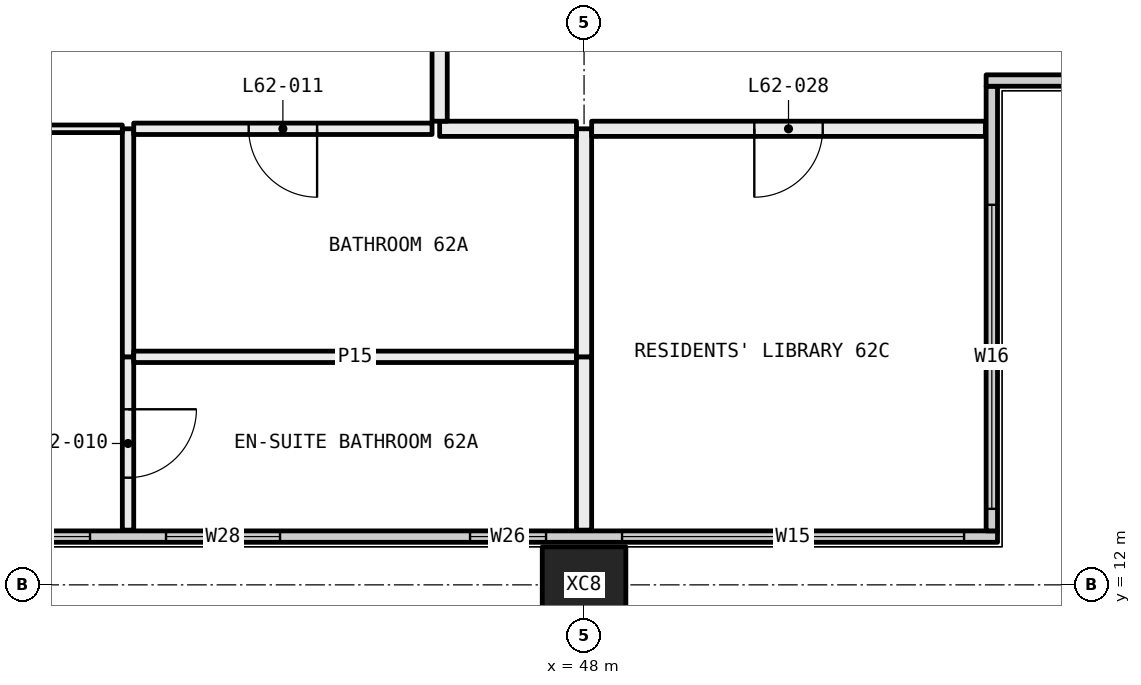
"""IFC4 building model, lengths in metres.
Left out: names, types, materials, properties, quantities, classifications, styles, units other than length and angle.
Written with IfcOpenShell. Run it as: python <this file> out.ifc"""

import sys

from ifc_helpers import new_model, si_unit, direction, frame, frame_2d, origin, origin_2d, place, context, subcontext, project, spatial, rectangle, hollow_rectangle, extrude, element, fill, save


model = new_model("IFC4")
c1 = context("Model", 3, precision=1e-05, world=origin(), true_north=direction((0.0, 1.0)))
c2 = subcontext(c1, "Body", "Model", "MODEL_VIEW")
j1 = project(units=[si_unit("LENGTHUNIT", "METRE"), si_unit("PLANEANGLEUNIT", "RADIAN")], contexts=[c1])
p1 = place(None, origin())
s1 = spatial("IfcSite", under=j1, at=p1, CompositionType="ELEMENT")
p2 = place(p1, origin())
s2 = spatial("IfcBuilding", under=s1, at=p2, CompositionType="ELEMENT")
p3 = place(p2, frame((0.0, 0.0, 231.75)))
s3 = spatial("IfcBuildingStorey", under=s2, at=p3, CompositionType="ELEMENT", Elevation=231.75)
p4 = place(p3, frame((48.0, 12.0, -0.4), z_axis=(0.0, 0.0, 1.0), x_axis=(1.0, 0.0, 0.0)))
e1 = element("IfcColumn", 1, at=p4, inside=s3, PredefinedType="COLUMN", context=c2, shape_type="SweptSolid", body=[
    extrude(hollow_rectangle(XDim=1.1, YDim=1.0, WallThickness=0.04, at=origin_2d()), origin(), (0.0, 0.0, 1.0), 3.45),
])
p5 = place(p3, frame((18.56, 12.635, 0.0), z_axis=(0.0, 0.0, 1.0), x_axis=(1.0, 0.0, 0.0)))
e2 = element("IfcWall", 2, at=p5, inside=s3, PredefinedType="ELEMENTEDWALL", context=c2, shape_type="SweptSolid", body=[
    extrude(rectangle(XDim=34.88, YDim=0.15, at=frame_2d((17.44, 0.0))), origin(), (0.0, 0.0, 1.0), 3.05),
])
p6 = place(p5, frame((0.44, 0.0, 0.45)))
e3 = element("IfcOpeningElement", 3, at=p6, cuts=e2, PredefinedType="OPENING", context=c2, shape_type="SweptSolid", body=[
    extrude(rectangle(XDim=4.5, YDim=2.55, at=frame_2d((2.25, 1.275))), frame((0.0, 0.085, 0.0), z_axis=(0.0, -1.0, 0.0), x_axis=(1.0, 0.0, 0.0)), (0.0, 0.0, 1.0), 0.17),
])
p7 = place(p5, frame((5.94, 0.0, 0.45)))
e4 = element("IfcOpeningElement", 4, at=p7, cuts=e2, PredefinedType="OPENING", context=c2, shape_type="SweptSolid", body=[
    extrude(rectangle(XDim=1.0, YDim=2.55, at=frame_2d((0.5, 1.275))), frame((0.0, 0.085, 0.0), z_axis=(0.0, -1.0, 0.0), x_axis=(1.0, 0.0, 0.0)), (0.0, 0.0, 1.0), 0.17),
])
p8 = place(p5, frame((9.44, 0.0, 0.45)))
e5 = element("IfcOpeningElement", 5, at=p8, cuts=e2, PredefinedType="OPENING", context=c2, shape_type="SweptSolid", body=[
    extrude(rectangle(XDim=1.5, YDim=2.55, at=frame_2d((0.75, 1.275))), frame((0.0, 0.085, 0.0), z_axis=(0.0, -1.0, 0.0), x_axis=(1.0, 0.0, 0.0)), (0.0, 0.0, 1.0), 0.17),
])
p9 = place(p5, frame((11.94, 0.0, 0.45)))
e6 = element("IfcOpeningElement", 6, at=p9, cuts=e2, PredefinedType="OPENING", context=c2, shape_type="SweptSolid", body=[
    extrude(rectangle(XDim=1.5, YDim=2.55, at=frame_2d((0.75, 1.275))), frame((0.0, 0.085, 0.0), z_axis=(0.0, -1.0, 0.0), x_axis=(1.0, 0.0, 0.0)), (0.0, 0.0, 1.0), 0.17),
])
p10 = place(p5, frame((15.94, 0.0, 0.45)))
e7 = element("IfcOpeningElement", 7, at=p10, cuts=e2, PredefinedType="OPENING", context=c2, shape_type="SweptSolid", body=[
    extrude(rectangle(XDim=1.0, YDim=2.55, at=frame_2d((0.5, 1.275))), frame((0.0, 0.085, 0.0), z_axis=(0.0, -1.0, 0.0), x_axis=(1.0, 0.0, 0.0)), (0.0, 0.0, 1.0), 0.17),
])
p11 = place(p5, frame((17.94, 0.0, 0.45)))
e8 = element("IfcOpeningElement", 8, at=p11, cuts=e2, PredefinedType="OPENING", context=c2, shape_type="SweptSolid", body=[
    extrude(rectangle(XDim=1.0, YDim=2.55, at=frame_2d((0.5, 1.275))), frame((0.0, 0.085, 0.0), z_axis=(0.0, -1.0, 0.0), x_axis=(1.0, 0.0, 0.0)), (0.0, 0.0, 1.0), 0.17),
])
p12 = place(p5, frame((21.44, 0.0, 0.45)))
e9 = element("IfcOpeningElement", 9, at=p12, cuts=e2, PredefinedType="OPENING", context=c2, shape_type="SweptSolid", body=[
    extrude(rectangle(XDim=1.5, YDim=2.55, at=frame_2d((0.75, 1.275))), frame((0.0, 0.085, 0.0), z_axis=(0.0, -1.0, 0.0), x_axis=(1.0, 0.0, 0.0)), (0.0, 0.0, 1.0), 0.17),
])
p13 = place(p5, frame((23.94, 0.0, 0.45)))
e10 = element("IfcOpeningElement", 10, at=p13, cuts=e2, PredefinedType="OPENING", context=c2, shape_type="SweptSolid", body=[
    extrude(rectangle(XDim=1.5, YDim=2.55, at=frame_2d((0.75, 1.275))), frame((0.0, 0.085, 0.0), z_axis=(0.0, -1.0, 0.0), x_axis=(1.0, 0.0, 0.0)), (0.0, 0.0, 1.0), 0.17),
])
p14 = place(p5, frame((27.94, 0.0, 0.45)))
e11 = element("IfcOpeningElement", 11, at=p14, cuts=e2, PredefinedType="OPENING", context=c2, shape_type="SweptSolid", body=[
    extrude(rectangle(XDim=1.0, YDim=2.55, at=frame_2d((0.5, 1.275))), frame((0.0, 0.085, 0.0), z_axis=(0.0, -1.0, 0.0), x_axis=(1.0, 0.0, 0.0)), (0.0, 0.0, 1.0), 0.17),
])
p15 = place(p5, frame((29.94, 0.0, 0.45)))
e12 = element("IfcOpeningElement", 12, at=p15, cuts=e2, PredefinedType="OPENING", context=c2, shape_type="SweptSolid", body=[
    extrude(rectangle(XDim=4.5, YDim=2.55, at=frame_2d((2.25, 1.275))), frame((0.0, 0.085, 0.0), z_axis=(0.0, -1.0, 0.0), x_axis=(1.0, 0.0, 0.0)), (0.0, 0.0, 1.0), 0.17),
])
p16 = place(p3, frame((53.365, 12.71, 0.0), z_axis=(0.0, 0.0, 1.0), x_axis=(0.0, 1.0, 0.0)))
e13 = element("IfcWall", 13, at=p16, inside=s3, PredefinedType="ELEMENTEDWALL", context=c2, shape_type="SweptSolid", body=[
    extrude(rectangle(XDim=5.85, YDim=0.15, at=frame_2d((2.925, 0.0))), origin(), (0.0, 0.0, 1.0), 3.05),
])
p17 = place(p16, frame((0.29, 0.0, 0.45)))
e14 = element("IfcOpeningElement", 14, at=p17, cuts=e13, PredefinedType="OPENING", context=c2, shape_type="SweptSolid", body=[
    extrude(rectangle(XDim=4.0, YDim=2.55, at=frame_2d((2.0, 1.275))), frame((0.0, 0.085, 0.0), z_axis=(0.0, -1.0, 0.0), x_axis=(1.0, 0.0, 0.0)), (0.0, 0.0, 1.0), 0.17),
])
p18 = place(p3, frame((53.29, 18.635, 0.0), z_axis=(0.0, 0.0, 1.0), x_axis=(1.0, 0.0, 0.0)))
e15 = element("IfcWall", 15, at=p18, inside=s3, PredefinedType="ELEMENTEDWALL", context=c2, shape_type="SweptSolid", body=[
    extrude(rectangle(XDim=6.15, YDim=0.15, at=frame_2d((3.075, 0.0))), origin(), (0.0, 0.0, 1.0), 3.05),
])
p19 = place(p18, frame((1.71, 0.0, 0.45)))
e16 = element("IfcOpeningElement", 16, at=p19, cuts=e15, PredefinedType="OPENING", context=c2, shape_type="SweptSolid", body=[
    extrude(rectangle(XDim=4.0, YDim=2.55, at=frame_2d((2.0, 1.275))), frame((0.0, 0.085, 0.0), z_axis=(0.0, -1.0, 0.0), x_axis=(1.0, 0.0, 0.0)), (0.0, 0.0, 1.0), 0.17),
])
p20 = place(p3, frame((42.0, 12.72, 0.0), z_axis=(0.0, 0.0, 1.0), x_axis=(0.0, 1.0, 0.0)))
e17 = element("IfcWall", 17, at=p20, inside=s3, PredefinedType="PARTITIONING", context=c2, shape_type="SweptSolid", body=[
    extrude(rectangle(XDim=2.28, YDim=0.15, at=frame_2d((1.14, 0.0))), origin(), (0.0, 0.0, 1.0), 3.05),
])
p21 = place(p20, frame((0.69, 0.0, 0.0)))
e18 = element("IfcOpeningElement", 18, at=p21, cuts=e17, PredefinedType="OPENING", context=c2, shape_type="SweptSolid", body=[
    extrude(rectangle(XDim=0.9, YDim=2.1, at=frame_2d((0.45, 1.05))), frame((0.0, 0.085, 0.0), z_axis=(0.0, -1.0, 0.0), x_axis=(1.0, 0.0, 0.0)), (0.0, 0.0, 1.0), 0.17),
])
p22 = place(p3, frame((42.0, 15.0, 0.0), z_axis=(0.0, 0.0, 1.0), x_axis=(0.0, 1.0, 0.0)))
e19 = element("IfcWall", 19, at=p22, inside=s3, PredefinedType="PARTITIONING", context=c2, shape_type="SweptSolid", body=[
    extrude(rectangle(XDim=3.0, YDim=0.15, at=frame_2d((1.5, 0.0))), origin(), (0.0, 0.0, 1.0), 3.05),
])
p23 = place(p3, frame((41.925, 18.0, 0.0), z_axis=(0.0, 0.0, 1.0), x_axis=(-1.0, 0.0, 0.0)))
e20 = element("IfcWall", 20, at=p23, inside=s3, PredefinedType="PARTITIONING", context=c2, shape_type="SweptSolid", body=[
    extrude(rectangle(XDim=5.875, YDim=0.1, at=frame_2d((2.938, 0.0))), origin(), (0.0, 0.0, 1.0), 2.45),
])
p24 = place(p23, frame((2.488, 0.0, 0.0)))
e21 = element("IfcOpeningElement", 21, at=p24, cuts=e20, PredefinedType="OPENING", context=c2, shape_type="SweptSolid", body=[
    extrude(rectangle(XDim=0.9, YDim=2.1, at=frame_2d((0.45, 1.05))), frame((0.0, 0.06, 0.0), z_axis=(0.0, -1.0, 0.0), x_axis=(1.0, 0.0, 0.0)), (0.0, 0.0, 1.0), 0.12),
])
p25 = place(p3, frame((47.9, 15.0, 0.0), z_axis=(0.0, 0.0, 1.0), x_axis=(-1.0, 0.0, 0.0)))
e22 = element("IfcWall", 22, at=p25, inside=s3, PredefinedType="PARTITIONING", context=c2, shape_type="SweptSolid", body=[
    extrude(rectangle(XDim=5.825, YDim=0.15, at=frame_2d((2.913, 0.0))), origin(), (0.0, 0.0, 1.0), 3.05),
])
p26 = place(p3, frame((48.0, 12.72, 0.0), z_axis=(0.0, 0.0, 1.0), x_axis=(0.0, 1.0, 0.0)))
e23 = element("IfcWall", 23, at=p26, inside=s3, PredefinedType="PARTITIONING", context=c2, shape_type="SweptSolid", body=[
    extrude(rectangle(XDim=2.28, YDim=0.2, at=frame_2d((1.14, 0.0))), origin(), (0.0, 0.0, 1.0), 3.05),
])
p27 = place(p3, frame((46.0, 18.0, 0.0), z_axis=(0.0, 0.0, 1.0), x_axis=(-1.0, 0.0, 0.0)))
e24 = element("IfcWall", 24, at=p27, inside=s3, PredefinedType="PARTITIONING", context=c2, shape_type="SweptSolid", body=[
    extrude(rectangle(XDim=3.925, YDim=0.15, at=frame_2d((1.962, 0.0))), origin(), (0.0, 0.0, 1.0), 3.05),
])
p28 = place(p27, frame((1.512, 0.0, 0.0)))
e25 = element("IfcOpeningElement", 25, at=p28, cuts=e24, PredefinedType="OPENING", context=c2, shape_type="SweptSolid", body=[
    extrude(rectangle(XDim=0.9, YDim=2.1, at=frame_2d((0.45, 1.05))), frame((0.0, 0.085, 0.0), z_axis=(0.0, -1.0, 0.0), x_axis=(1.0, 0.0, 0.0)), (0.0, 0.0, 1.0), 0.17),
])
p29 = place(p3, frame((48.0, 15.0, 0.0), z_axis=(0.0, 0.0, 1.0), x_axis=(0.0, 1.0, 0.0)))
e26 = element("IfcWall", 26, at=p29, inside=s3, PredefinedType="PARTITIONING", context=c2, shape_type="SweptSolid", body=[
    extrude(rectangle(XDim=3.0, YDim=0.2, at=frame_2d((1.5, 0.0))), origin(), (0.0, 0.0, 1.0), 3.05),
])
p30 = place(p3, frame((47.9, 18.0, 0.0), z_axis=(0.0, 0.0, 1.0), x_axis=(-1.0, 0.0, 0.0)))
e27 = element("IfcWall", 27, at=p30, inside=s3, PredefinedType="PARTITIONING", context=c2, shape_type="SweptSolid", body=[
    extrude(rectangle(XDim=1.8, YDim=0.2, at=frame_2d((0.9, 0.0))), origin(), (0.0, 0.0, 1.0), 3.05),
])
p31 = place(p3, frame((46.1, 18.1, 0.0), z_axis=(0.0, 0.0, 1.0), x_axis=(0.0, 1.0, 0.0)))
e28 = element("IfcWall", 28, at=p31, inside=s3, PredefinedType="PARTITIONING", context=c2, shape_type="SweptSolid", body=[
    extrude(rectangle(XDim=6.2, YDim=0.2, at=frame_2d((3.1, 0.0))), origin(), (0.0, 0.0, 1.0), 2.45),
])
p32 = place(p3, frame((53.28, 18.0, 0.0), z_axis=(0.0, 0.0, 1.0), x_axis=(-1.0, 0.0, 0.0)))
e29 = element("IfcWall", 29, at=p32, inside=s3, PredefinedType="PARTITIONING", context=c2, shape_type="SweptSolid", body=[
    extrude(rectangle(XDim=5.18, YDim=0.2, at=frame_2d((2.59, 0.0))), origin(), (0.0, 0.0, 1.0), 3.05),
])
p33 = place(p32, frame((2.14, 0.0, 0.0)))
e30 = element("IfcOpeningElement", 30, at=p33, cuts=e29, PredefinedType="OPENING", context=c2, shape_type="SweptSolid", body=[
    extrude(rectangle(XDim=0.9, YDim=2.1, at=frame_2d((0.45, 1.05))), frame((0.0, 0.11, 0.0), z_axis=(0.0, -1.0, 0.0), x_axis=(1.0, 0.0, 0.0)), (0.0, 0.0, 1.0), 0.22),
])
p34 = place(p12, origin())
e31 = element("IfcWindow", 31, at=p34, inside=s3, PartitioningType="SINGLE_PANEL", PredefinedType="WINDOW", context=c2, shape_type="SweptSolid", body=[
    extrude(rectangle(XDim=1.5, YDim=2.55, at=frame_2d((0.75, 1.275))), frame((0.0, 0.03, 0.0), z_axis=(0.0, -1.0, 0.0), x_axis=(1.0, 0.0, 0.0)), (0.0, 0.0, 1.0), 0.06),
])
fill(e9, e31)
p35 = place(p13, origin())
e32 = element("IfcWindow", 32, at=p35, inside=s3, PartitioningType="SINGLE_PANEL", PredefinedType="WINDOW", context=c2, shape_type="SweptSolid", body=[
    extrude(rectangle(XDim=1.5, YDim=2.55, at=frame_2d((0.75, 1.275))), frame((0.0, 0.03, 0.0), z_axis=(0.0, -1.0, 0.0), x_axis=(1.0, 0.0, 0.0)), (0.0, 0.0, 1.0), 0.06),
])
fill(e10, e32)
p36 = place(p14, origin())
e33 = element("IfcWindow", 33, at=p36, inside=s3, PartitioningType="SINGLE_PANEL", PredefinedType="WINDOW", context=c2, shape_type="SweptSolid", body=[
    extrude(rectangle(XDim=1.0, YDim=2.55, at=frame_2d((0.5, 1.275))), frame((0.0, 0.03, 0.0), z_axis=(0.0, -1.0, 0.0), x_axis=(1.0, 0.0, 0.0)), (0.0, 0.0, 1.0), 0.06),
])
fill(e11, e33)
p37 = place(p15, origin())
e34 = element("IfcWindow", 34, at=p37, inside=s3, PartitioningType="SINGLE_PANEL", PredefinedType="WINDOW", context=c2, shape_type="SweptSolid", body=[
    extrude(rectangle(XDim=4.5, YDim=2.55, at=frame_2d((2.25, 1.275))), frame((0.0, 0.03, 0.0), z_axis=(0.0, -1.0, 0.0), x_axis=(1.0, 0.0, 0.0)), (0.0, 0.0, 1.0), 0.06),
])
fill(e12, e34)
p38 = place(p17, origin())
e35 = element("IfcWindow", 35, at=p38, inside=s3, PartitioningType="SINGLE_PANEL", PredefinedType="WINDOW", context=c2, shape_type="SweptSolid", body=[
    extrude(rectangle(XDim=4.0, YDim=2.55, at=frame_2d((2.0, 1.275))), frame((0.0, 0.03, 0.0), z_axis=(0.0, -1.0, 0.0), x_axis=(1.0, 0.0, 0.0)), (0.0, 0.0, 1.0), 0.06),
])
fill(e14, e35)
p39 = place(p21, frame((0.9, 0.0, 0.0), x_axis=(-1.0, 0.0, 0.0)))
e36 = element("IfcDoor", 36, at=p39, inside=s3, OperationType="SINGLE_SWING_RIGHT", PredefinedType="DOOR", context=c2, shape_type="SweptSolid", body=[
    extrude(rectangle(XDim=0.9, YDim=2.1, at=frame_2d((0.45, 1.05))), frame((0.0, 0.025, 0.0), z_axis=(0.0, -1.0, 0.0), x_axis=(1.0, 0.0, 0.0)), (0.0, 0.0, 1.0), 0.05),
])
fill(e18, e36)
p40 = place(p28, origin())
e37 = element("IfcDoor", 37, at=p40, inside=s3, OperationType="SINGLE_SWING_RIGHT", PredefinedType="DOOR", context=c2, shape_type="SweptSolid", body=[
    extrude(rectangle(XDim=0.9, YDim=2.1, at=frame_2d((0.45, 1.05))), frame((0.0, 0.025, 0.0), z_axis=(0.0, -1.0, 0.0), x_axis=(1.0, 0.0, 0.0)), (0.0, 0.0, 1.0), 0.05),
])
fill(e25, e37)
p41 = place(p33, origin())
e38 = element("IfcDoor", 38, at=p41, inside=s3, OperationType="SINGLE_SWING_LEFT", PredefinedType="DOOR", context=c2, shape_type="SweptSolid", body=[
    extrude(rectangle(XDim=0.9, YDim=2.1, at=frame_2d((0.45, 1.05))), frame((0.0, 0.025, 0.0), z_axis=(0.0, -1.0, 0.0), x_axis=(1.0, 0.0, 0.0)), (0.0, 0.0, 1.0), 0.05),
])
fill(e30, e38)
save(model, sys.argv[1])
